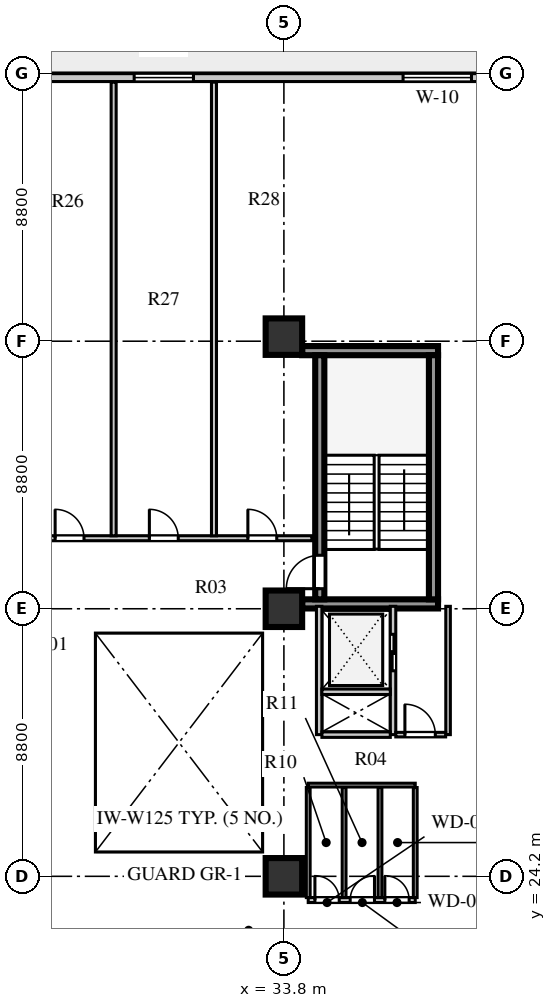
"""IFC4 building model, lengths in metres.
Left out: names, types, materials, properties, quantities, classifications, styles, units other than length and angle.
Written with IfcOpenShell. Run it as: python <this file> out.ifc"""

import sys

from ifc_helpers import new_model, si_unit, direction, frame, frame_2d, origin, origin_2d, place, context, subcontext, project, spatial, rectangle, extrude, element, fill, save


model = new_model("IFC4")
c1 = context("Model", 3, precision=1e-05, world=origin(), true_north=direction((0.0, 1.0)))
c2 = subcontext(c1, "Body", "Model", "MODEL_VIEW")
j1 = project(units=[si_unit("LENGTHUNIT", "METRE"), si_unit("PLANEANGLEUNIT", "RADIAN")], contexts=[c1])
p1 = place(None, origin())
s1 = spatial("IfcSite", under=j1, at=p1, CompositionType="ELEMENT")
p2 = place(p1, origin())
s2 = spatial("IfcBuilding", under=s1, at=p2, CompositionType="ELEMENT")
p3 = place(p2, frame((0.0, 0.0, 66.0)))
s3 = spatial("IfcBuildingStorey", under=s2, at=p3, CompositionType="ELEMENT", Elevation=66.0)
for number, where, z_axis, x_axis in (
    (1, (34.4, 33.16, 0.0), (0.0, 0.0, 1.0), (1.0, 0.0, 0.0)),
    (2, (34.4, 41.49, 0.0), (0.0, 0.0, 1.0), (1.0, 0.0, 0.0)),
):
    element("IfcWall", number, at=place(p3, frame(where, z_axis=z_axis, x_axis=x_axis)), inside=s3, PredefinedType="SHEAR", context=c2, shape_type="SweptSolid", body=[
        extrude(rectangle(XDim=4.47, YDim=0.3, at=frame_2d((2.235, 0.0))), origin(), (0.0, 0.0, 1.0), 3.72),
    ])
p4 = place(p3, frame((34.98, 33.31, 0.0), z_axis=(0.0, 0.0, 1.0), x_axis=(0.0, 1.0, 0.0)))
e3 = element("IfcWall", 3, at=p4, inside=s3, PredefinedType="SHEAR", context=c2, shape_type="SweptSolid", body=[
    extrude(rectangle(XDim=8.03, YDim=0.3, at=frame_2d((4.015, 0.0))), origin(), (0.0, 0.0, 1.0), 3.72),
])
p5 = place(p4, frame((0.35, 0.0, 0.0)))
e4 = element("IfcOpeningElement", 4, at=p5, cuts=e3, PredefinedType="OPENING", context=c2, shape_type="SweptSolid", body=[
    extrude(rectangle(XDim=1.1, YDim=2.1, at=frame_2d((0.55, 1.05))), frame((0.0, 0.16, 0.0), z_axis=(0.0, -1.0, 0.0), x_axis=(1.0, 0.0, 0.0)), (0.0, 0.0, 1.0), 0.32),
])
p6 = place(p3, frame((38.72, 33.31, 0.0), z_axis=(0.0, 0.0, 1.0), x_axis=(0.0, 1.0, 0.0)))
e5 = element("IfcWall", 5, at=p6, inside=s3, PredefinedType="SHEAR", context=c2, shape_type="SweptSolid", body=[
    extrude(rectangle(XDim=8.03, YDim=0.3, at=frame_2d((4.015, 0.0))), origin(), (0.0, 0.0, 1.0), 3.72),
])
for number, where, z_axis, x_axis in (
    (6, (33.8, 24.2, 0.0), (0.0, 0.0, 1.0), (1.0, 0.0, 0.0)),
    (7, (33.8, 33.0, 0.0), (0.0, 0.0, 1.0), (1.0, 0.0, 0.0)),
    (8, (33.8, 41.95, 0.0), (0.0, 0.0, 1.0), (1.0, 0.0, 0.0)),
):
    element("IfcColumn", number, at=place(p3, frame(where, z_axis=z_axis, x_axis=x_axis)), inside=s3, PredefinedType="COLUMN", context=c2, shape_type="SweptSolid", body=[
        extrude(rectangle(XDim=1.2, YDim=1.2, at=origin_2d()), origin(), (0.0, 0.0, 1.0), 3.72),
    ])
p7 = place(p3, frame((46.3, 50.47, 0.0), z_axis=(0.0, 0.0, 1.0), x_axis=(-1.0, 0.0, 0.0)))
e9 = element("IfcWall", 9, at=p7, inside=s3, PredefinedType="SOLIDWALL", context=c2, shape_type="SweptSolid", body=[
    extrude(rectangle(XDim=34.0, YDim=0.26, at=frame_2d((17.0, 0.0))), origin(), (0.0, 0.0, 1.0), 3.72),
])
p8 = place(p7, frame((32.05, 0.0, 0.0)))
e10 = element("IfcOpeningElement", 10, at=p8, cuts=e9, PredefinedType="OPENING", context=c2, shape_type="SweptSolid", body=[
    extrude(rectangle(XDim=1.0, YDim=2.05, at=frame_2d((0.5, 1.025))), frame((0.0, 0.14, 0.0), z_axis=(0.0, -1.0, 0.0), x_axis=(1.0, 0.0, 0.0)), (0.0, 0.0, 1.0), 0.28),
])
p9 = place(p7, frame((24.395, 0.0, 0.8)))
e11 = element("IfcOpeningElement", 11, at=p9, cuts=e9, PredefinedType="OPENING", context=c2, shape_type="SweptSolid", body=[
    extrude(rectangle(XDim=1.65, YDim=1.95, at=frame_2d((0.825, 0.975))), frame((0.0, 0.14, 0.0), z_axis=(0.0, -1.0, 0.0), x_axis=(1.0, 0.0, 0.0)), (0.0, 0.0, 1.0), 0.28),
])
p10 = place(p7, frame((15.475, 0.0, 0.8)))
e12 = element("IfcOpeningElement", 12, at=p10, cuts=e9, PredefinedType="OPENING", context=c2, shape_type="SweptSolid", body=[
    extrude(rectangle(XDim=1.95, YDim=2.0, at=frame_2d((0.975, 1.0))), frame((0.0, 0.14, 0.0), z_axis=(0.0, -1.0, 0.0), x_axis=(1.0, 0.0, 0.0)), (0.0, 0.0, 1.0), 0.28),
])
p11 = place(p7, frame((6.33, 0.0, 0.8)))
e13 = element("IfcOpeningElement", 13, at=p11, cuts=e9, PredefinedType="OPENING", context=c2, shape_type="SweptSolid", body=[
    extrude(rectangle(XDim=2.25, YDim=2.0, at=frame_2d((1.125, 1.0))), frame((0.0, 0.14, 0.0), z_axis=(0.0, -1.0, 0.0), x_axis=(1.0, 0.0, 0.0)), (0.0, 0.0, 1.0), 0.28),
])
p12 = place(p3, frame((34.96, 28.86, 0.0), z_axis=(0.0, 0.0, 1.0), x_axis=(0.0, 1.0, 0.0)))
e14 = element("IfcWall", 14, at=p12, inside=s3, PredefinedType="SOLIDWALL", context=c2, shape_type="SweptSolid", body=[
    extrude(rectangle(XDim=4.22, YDim=0.18, at=frame_2d((2.11, 0.0))), origin(), (0.0, 0.0, 1.0), 3.72),
])
p13 = place(p3, frame((37.39, 28.86, 0.0), z_axis=(0.0, 0.0, 1.0), x_axis=(0.0, 1.0, 0.0)))
e15 = element("IfcWall", 15, at=p13, inside=s3, PredefinedType="SOLIDWALL", context=c2, shape_type="SweptSolid", body=[
    extrude(rectangle(XDim=4.22, YDim=0.18, at=frame_2d((2.11, 0.0))), origin(), (0.0, 0.0, 1.0), 3.72),
])
p14 = place(p13, frame((2.1, 0.0, 0.0)))
e16 = element("IfcOpeningElement", 16, at=p14, cuts=e15, PredefinedType="OPENING", context=c2, shape_type="SweptSolid", body=[
    extrude(rectangle(XDim=1.2, YDim=2.12, at=frame_2d((0.6, 1.06))), frame((0.0, 0.1, 0.0), z_axis=(0.0, -1.0, 0.0), x_axis=(1.0, 0.0, 0.0)), (0.0, 0.0, 1.0), 0.2),
])
for number, where, z_axis, x_axis in (
    (17, (35.05, 28.86, 0.0), (0.0, 0.0, 1.0), (1.0, 0.0, 0.0)),
    (18, (35.05, 30.27, 0.0), (0.0, 0.0, 1.0), (1.0, 0.0, 0.0)),
):
    element("IfcWall", number, at=place(p3, frame(where, z_axis=z_axis, x_axis=x_axis)), inside=s3, PredefinedType="SOLIDWALL", context=c2, shape_type="SweptSolid", body=[
        extrude(rectangle(XDim=2.25, YDim=0.18, at=frame_2d((1.125, 0.0))), origin(), (0.0, 0.0, 1.0), 3.72),
    ])
p15 = place(p3, frame((39.2, 28.86, 0.0), z_axis=(0.0, 0.0, 1.0), x_axis=(0.0, 1.0, 0.0)))
e19 = element("IfcWall", 19, at=p15, inside=s3, PredefinedType="PARTITIONING", context=c2, shape_type="SweptSolid", body=[
    extrude(rectangle(XDim=4.22, YDim=0.15, at=frame_2d((2.11, 0.0))), origin(), (0.0, 0.0, 1.0), 3.72),
])
p16 = place(p3, frame((37.48, 28.86, 0.0), z_axis=(0.0, 0.0, 1.0), x_axis=(1.0, 0.0, 0.0)))
e20 = element("IfcWall", 20, at=p16, inside=s3, PredefinedType="PARTITIONING", context=c2, shape_type="SweptSolid", body=[
    extrude(rectangle(XDim=1.64, YDim=0.15, at=frame_2d((0.82, 0.0))), origin(), (0.0, 0.0, 1.0), 3.72),
])
p17 = place(p16, frame((0.3, 0.0, 0.0)))
e21 = element("IfcOpeningElement", 21, at=p17, cuts=e20, PredefinedType="OPENING", context=c2, shape_type="SweptSolid", body=[
    extrude(rectangle(XDim=1.0, YDim=2.1, at=frame_2d((0.5, 1.05))), frame((0.0, 0.085, 0.0), z_axis=(0.0, -1.0, 0.0), x_axis=(1.0, 0.0, 0.0)), (0.0, 0.0, 1.0), 0.17),
])
p18 = place(p3, frame((34.6, 23.42, 0.0), z_axis=(0.0, 0.0, 1.0), x_axis=(1.0, 0.0, 0.0)))
e22 = element("IfcWall", 22, at=p18, inside=s3, PredefinedType="PARTITIONING", context=c2, shape_type="SweptSolid", body=[
    extrude(rectangle(XDim=3.52, YDim=0.165, at=frame_2d((1.76, 0.0))), origin(), (0.0, 0.0, 1.0), 3.72),
])
p19 = place(p18, frame((0.22, 0.0, 0.0)))
e23 = element("IfcOpeningElement", 23, at=p19, cuts=e22, PredefinedType="OPENING", context=c2, shape_type="SweptSolid", body=[
    extrude(rectangle(XDim=0.8, YDim=2.05, at=frame_2d((0.4, 1.025))), frame((0.0, 0.093, 0.0), z_axis=(0.0, -1.0, 0.0), x_axis=(1.0, 0.0, 0.0)), (0.0, 0.0, 1.0), 0.185),
])
p20 = place(p18, frame((1.38, 0.0, 0.0)))
e24 = element("IfcOpeningElement", 24, at=p20, cuts=e22, PredefinedType="OPENING", context=c2, shape_type="SweptSolid", body=[
    extrude(rectangle(XDim=0.8, YDim=2.05, at=frame_2d((0.4, 1.025))), frame((0.0, 0.093, 0.0), z_axis=(0.0, -1.0, 0.0), x_axis=(1.0, 0.0, 0.0)), (0.0, 0.0, 1.0), 0.185),
])
p21 = place(p18, frame((2.52, 0.0, 0.0)))
e25 = element("IfcOpeningElement", 25, at=p21, cuts=e22, PredefinedType="OPENING", context=c2, shape_type="SweptSolid", body=[
    extrude(rectangle(XDim=0.8, YDim=2.05, at=frame_2d((0.4, 1.025))), frame((0.0, 0.093, 0.0), z_axis=(0.0, -1.0, 0.0), x_axis=(1.0, 0.0, 0.0)), (0.0, 0.0, 1.0), 0.185),
])
p22 = place(p3, frame((25.25, 35.32, 0.0), z_axis=(0.0, 0.0, 1.0), x_axis=(1.0, 0.0, 0.0)))
e26 = element("IfcWall", 26, at=p22, inside=s3, PredefinedType="PARTITIONING", context=c2, shape_type="SweptSolid", body=[
    extrude(rectangle(XDim=9.47, YDim=0.165, at=frame_2d((4.735, 0.0))), origin(), (0.0, 0.0, 1.0), 3.72),
])
p23 = place(p22, frame((1.025, 0.0, 0.0)))
e27 = element("IfcOpeningElement", 27, at=p23, cuts=e26, PredefinedType="OPENING", context=c2, shape_type="SweptSolid", body=[
    extrude(rectangle(XDim=0.95, YDim=2.08, at=frame_2d((0.475, 1.04))), frame((0.0, 0.093, 0.0), z_axis=(0.0, -1.0, 0.0), x_axis=(1.0, 0.0, 0.0)), (0.0, 0.0, 1.0), 0.185),
])
p24 = place(p22, frame((4.125, 0.0, 0.0)))
e28 = element("IfcOpeningElement", 28, at=p24, cuts=e26, PredefinedType="OPENING", context=c2, shape_type="SweptSolid", body=[
    extrude(rectangle(XDim=0.95, YDim=2.08, at=frame_2d((0.475, 1.04))), frame((0.0, 0.093, 0.0), z_axis=(0.0, -1.0, 0.0), x_axis=(1.0, 0.0, 0.0)), (0.0, 0.0, 1.0), 0.185),
])
p25 = place(p22, frame((7.365, 0.0, 0.0)))
e29 = element("IfcOpeningElement", 29, at=p25, cuts=e26, PredefinedType="OPENING", context=c2, shape_type="SweptSolid", body=[
    extrude(rectangle(XDim=0.95, YDim=2.08, at=frame_2d((0.475, 1.04))), frame((0.0, 0.093, 0.0), z_axis=(0.0, -1.0, 0.0), x_axis=(1.0, 0.0, 0.0)), (0.0, 0.0, 1.0), 0.185),
])
p26 = place(p3, frame((34.6, 27.2, 0.0), z_axis=(0.0, 0.0, 1.0), x_axis=(1.0, 0.0, 0.0)))
e30 = element("IfcWall", 30, at=p26, inside=s3, PredefinedType="PLUMBINGWALL", context=c2, shape_type="SweptSolid", body=[
    extrude(rectangle(XDim=3.52, YDim=0.125, at=frame_2d((1.76, 0.0))), origin(), (0.0, 0.0, 1.0), 3.32),
])
for number, where, z_axis, x_axis in (
    (31, (34.6, 23.5, 0.0), (0.0, 0.0, 1.0), (0.0, 1.0, 0.0)),
    (32, (38.12, 23.5, 0.0), (0.0, 0.0, 1.0), (0.0, 1.0, 0.0)),
    (33, (35.78, 23.5, 0.0), (0.0, 0.0, 1.0), (0.0, 1.0, 0.0)),
    (34, (36.96, 23.5, 0.0), (0.0, 0.0, 1.0), (0.0, 1.0, 0.0)),
):
    element("IfcWall", number, at=place(p3, frame(where, z_axis=z_axis, x_axis=x_axis)), inside=s3, PredefinedType="PLUMBINGWALL", context=c2, shape_type="SweptSolid", body=[
        extrude(rectangle(XDim=3.62, YDim=0.125, at=frame_2d((1.81, 0.0))), origin(), (0.0, 0.0, 1.0), 3.72),
    ])
for number, where, z_axis, x_axis in (
    (35, (28.2, 35.4, 0.0), (0.0, 0.0, 1.0), (0.0, 1.0, 0.0)),
    (36, (31.5, 35.4, 0.0), (0.0, 0.0, 1.0), (0.0, 1.0, 0.0)),
):
    element("IfcWall", number, at=place(p3, frame(where, z_axis=z_axis, x_axis=x_axis)), inside=s3, PredefinedType="PARTITIONING", context=c2, shape_type="SweptSolid", body=[
        extrude(rectangle(XDim=14.92, YDim=0.165, at=frame_2d((7.46, 0.0))), origin(), (0.0, 0.0, 1.0), 3.72),
    ])
p27 = place(p10, origin())
e37 = element("IfcWindow", 37, at=p27, inside=s3, PartitioningType="SINGLE_PANEL", PredefinedType="WINDOW", context=c2, shape_type="SweptSolid", body=[
    extrude(rectangle(XDim=1.95, YDim=2.0, at=frame_2d((0.975, 1.0))), frame((0.0, 0.03, 0.0), z_axis=(0.0, -1.0, 0.0), x_axis=(1.0, 0.0, 0.0)), (0.0, 0.0, 1.0), 0.06),
])
fill(e12, e37)
p28 = place(p11, origin())
e38 = element("IfcWindow", 38, at=p28, inside=s3, PartitioningType="SINGLE_PANEL", PredefinedType="WINDOW", context=c2, shape_type="SweptSolid", body=[
    extrude(rectangle(XDim=2.25, YDim=2.0, at=frame_2d((1.125, 1.0))), frame((0.0, 0.03, 0.0), z_axis=(0.0, -1.0, 0.0), x_axis=(1.0, 0.0, 0.0)), (0.0, 0.0, 1.0), 0.06),
])
fill(e13, e38)
p29 = place(p5, origin())
e39 = element("IfcDoor", 39, at=p29, inside=s3, OperationType="SINGLE_SWING_LEFT", PredefinedType="DOOR", context=c2, shape_type="SweptSolid", body=[
    extrude(rectangle(XDim=1.1, YDim=2.1, at=frame_2d((0.55, 1.05))), frame((0.0, 0.025, 0.0), z_axis=(0.0, -1.0, 0.0), x_axis=(1.0, 0.0, 0.0)), (0.0, 0.0, 1.0), 0.05),
])
fill(e4, e39)
p30 = place(p14, frame((1.2, 0.0, 0.0), z_axis=(0.0, 0.0, 1.0), x_axis=(-1.0, 0.0, 0.0)))
e40 = element("IfcDoor", 40, at=p30, inside=s3, OperationType="DOUBLE_DOOR_SLIDING", PredefinedType="DOOR", context=c2, shape_type="SweptSolid", body=[
    extrude(rectangle(XDim=1.2, YDim=2.12, at=frame_2d((0.6, 1.06))), frame((0.0, 0.025, 0.0), z_axis=(0.0, -1.0, 0.0), x_axis=(1.0, 0.0, 0.0)), (0.0, 0.0, 1.0), 0.05),
])
fill(e16, e40)
p31 = place(p17, origin())
e41 = element("IfcDoor", 41, at=p31, inside=s3, OperationType="SINGLE_SWING_LEFT", PredefinedType="DOOR", context=c2, shape_type="SweptSolid", body=[
    extrude(rectangle(XDim=1.0, YDim=2.1, at=frame_2d((0.5, 1.05))), frame((0.0, 0.025, 0.0), z_axis=(0.0, -1.0, 0.0), x_axis=(1.0, 0.0, 0.0)), (0.0, 0.0, 1.0), 0.05),
])
fill(e21, e41)
p32 = place(p19, origin())
e42 = element("IfcDoor", 42, at=p32, inside=s3, OperationType="SINGLE_SWING_LEFT", PredefinedType="DOOR", context=c2, shape_type="SweptSolid", body=[
    extrude(rectangle(XDim=0.8, YDim=2.05, at=frame_2d((0.4, 1.025))), frame((0.0, 0.025, 0.0), z_axis=(0.0, -1.0, 0.0), x_axis=(1.0, 0.0, 0.0)), (0.0, 0.0, 1.0), 0.05),
])
fill(e23, e42)
p33 = place(p20, origin())
e43 = element("IfcDoor", 43, at=p33, inside=s3, OperationType="SINGLE_SWING_RIGHT", PredefinedType="DOOR", context=c2, shape_type="SweptSolid", body=[
    extrude(rectangle(XDim=0.8, YDim=2.05, at=frame_2d((0.4, 1.025))), frame((0.0, 0.025, 0.0), z_axis=(0.0, -1.0, 0.0), x_axis=(1.0, 0.0, 0.0)), (0.0, 0.0, 1.0), 0.05),
])
fill(e24, e43)
p34 = place(p21, origin())
e44 = element("IfcDoor", 44, at=p34, inside=s3, OperationType="SINGLE_SWING_LEFT", PredefinedType="DOOR", context=c2, shape_type="SweptSolid", body=[
    extrude(rectangle(XDim=0.8, YDim=2.05, at=frame_2d((0.4, 1.025))), frame((0.0, 0.025, 0.0), z_axis=(0.0, -1.0, 0.0), x_axis=(1.0, 0.0, 0.0)), (0.0, 0.0, 1.0), 0.05),
])
fill(e25, e44)
p35 = place(p23, origin())
e45 = element("IfcDoor", 45, at=p35, inside=s3, OperationType="SINGLE_SWING_LEFT", PredefinedType="DOOR", context=c2, shape_type="SweptSolid", body=[
    extrude(rectangle(XDim=0.95, YDim=2.08, at=frame_2d((0.475, 1.04))), frame((0.0, 0.025, 0.0), z_axis=(0.0, -1.0, 0.0), x_axis=(1.0, 0.0, 0.0)), (0.0, 0.0, 1.0), 0.05),
])
fill(e27, e45)
p36 = place(p24, origin())
e46 = element("IfcDoor", 46, at=p36, inside=s3, OperationType="SINGLE_SWING_LEFT", PredefinedType="DOOR", context=c2, shape_type="SweptSolid", body=[
    extrude(rectangle(XDim=0.95, YDim=2.08, at=frame_2d((0.475, 1.04))), frame((0.0, 0.025, 0.0), z_axis=(0.0, -1.0, 0.0), x_axis=(1.0, 0.0, 0.0)), (0.0, 0.0, 1.0), 0.05),
])
fill(e28, e46)
p37 = place(p25, origin())
e47 = element("IfcDoor", 47, at=p37, inside=s3, OperationType="SINGLE_SWING_LEFT", PredefinedType="DOOR", context=c2, shape_type="SweptSolid", body=[
    extrude(rectangle(XDim=0.95, YDim=2.08, at=frame_2d((0.475, 1.04))), frame((0.0, 0.025, 0.0), z_axis=(0.0, -1.0, 0.0), x_axis=(1.0, 0.0, 0.0)), (0.0, 0.0, 1.0), 0.05),
])
fill(e29, e47)
save(model, sys.argv[1])
